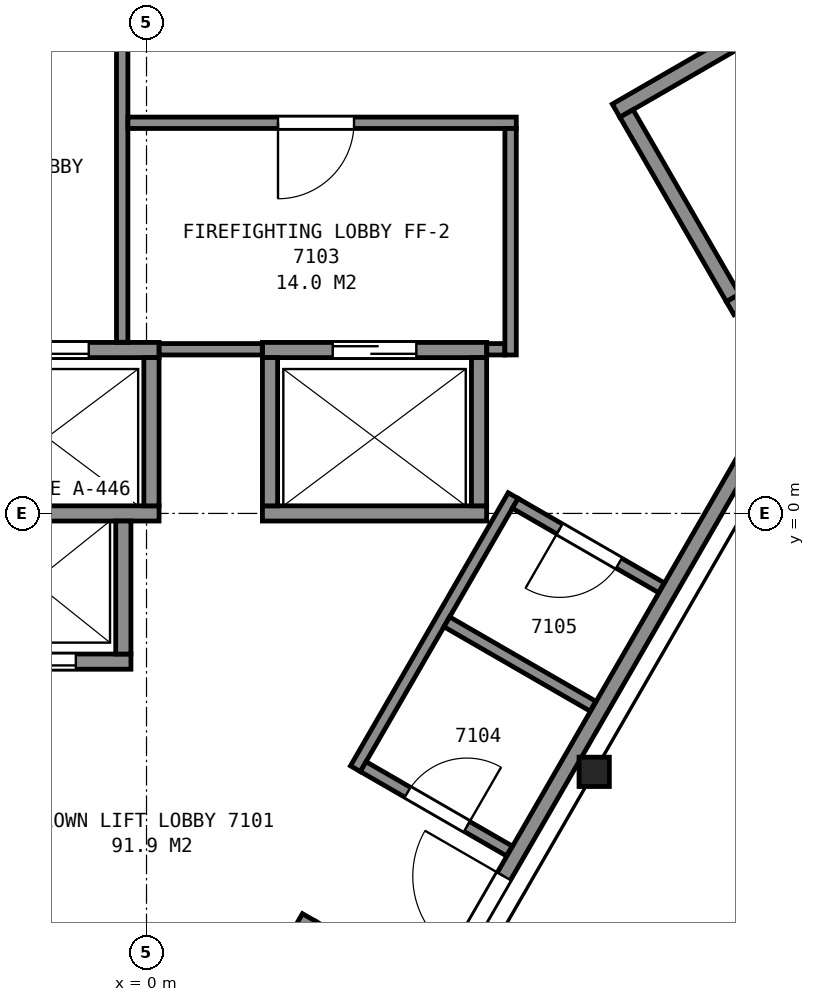
"""IFC4 building model, lengths in metres.
Left out: names, types, materials, properties, quantities, classifications, styles, units other than length and angle.
Written with IfcOpenShell. Run it as: python <this file> out.ifc"""

import sys

from ifc_helpers import new_model, si_unit, direction, frame, frame_2d, origin, origin_2d, place, context, subcontext, project, spatial, rectangle, i_section, extrude, element, fill, save


model = new_model("IFC4")
c1 = context("Model", 3, precision=1e-05, world=origin(), true_north=direction((0.0, 1.0)))
c2 = subcontext(c1, "Body", "Model", "MODEL_VIEW")
j1 = project(units=[si_unit("LENGTHUNIT", "METRE"), si_unit("PLANEANGLEUNIT", "RADIAN")], contexts=[c1])
p1 = place(None, origin())
s1 = spatial("IfcSite", under=j1, at=p1, CompositionType="ELEMENT")
p2 = place(p1, origin())
s2 = spatial("IfcBuilding", under=s1, at=p2, CompositionType="ELEMENT")
p3 = place(p2, frame((0.0, 0.0, 282.5)))
s3 = spatial("IfcBuildingStorey", under=s2, at=p3, CompositionType="ELEMENT", Elevation=282.5)
p4 = place(p3, frame((5.89, -3.4, 0.0), z_axis=(0.0, 0.0, 1.0), x_axis=(1.0, 0.0, 0.0)))
e1 = element("IfcColumn", 1, at=p4, inside=s3, PredefinedType="COLUMN", context=c2, shape_type="SweptSolid", body=[
    extrude(i_section(OverallWidth=0.399, OverallDepth=0.386, WebThickness=0.021, FlangeThickness=0.033, FilletRadius=0.015, at=origin_2d()), origin(), (0.0, 0.0, 1.0), 3.7),
])
for number, where, z_axis, x_axis in (
    (2, (6.178, 5.299, 0.0), (0.0, 0.0, 1.0), (0.866, 0.5, 0.0)),
    (3, (7.678, 2.701, 0.0), (0.0, 0.0, 1.0), (0.866, 0.5, 0.0)),
):
    element("IfcWall", number, at=place(p3, frame(where, z_axis=z_axis, x_axis=x_axis)), inside=s3, PredefinedType="PARTITIONING", context=c2, shape_type="SweptSolid", body=[
        extrude(rectangle(XDim=7.2, YDim=0.2, at=frame_2d((3.6, 0.0))), origin(), (0.0, 0.0, 1.0), 3.45),
    ])
p5 = place(p3, frame((7.715, 2.838, 0.0), z_axis=(0.0, 0.0, 1.0), x_axis=(-0.500049511043, 0.865996816683, 0.0)))
e4 = element("IfcWall", 4, at=p5, inside=s3, PredefinedType="PARTITIONING", context=c2, shape_type="SweptSolid", body=[
    extrude(rectangle(XDim=2.8, YDim=0.2, at=frame_2d((1.4, 0.0))), origin(), (0.0, 0.0, 1.0), 3.45),
])
p6 = place(p3, frame((-2.755, -1.95, 0.0), z_axis=(0.0, 0.0, 1.0), x_axis=(1.0, 0.0, 0.0)))
e5 = element("IfcWall", 5, at=p6, inside=s3, PredefinedType="PARTITIONING", context=c2, shape_type="SweptSolid", body=[
    extrude(rectangle(XDim=2.55, YDim=0.2, at=frame_2d((1.275, 0.0))), origin(), (0.0, 0.0, 1.0), 3.7),
])
p7 = place(p6, frame((0.725, 0.0, 0.0)))
e6 = element("IfcOpeningElement", 6, at=p7, cuts=e5, PredefinedType="OPENING", context=c2, shape_type="SweptSolid", body=[
    extrude(rectangle(XDim=1.1, YDim=2.1, at=frame_2d((0.55, 1.05))), frame((0.0, 0.11, 0.0), z_axis=(0.0, -1.0, 0.0), x_axis=(1.0, 0.0, 0.0)), (0.0, 0.0, 1.0), 0.22),
])
p8 = place(p3, frame((-2.785, 0.0, 0.0), z_axis=(0.0, 0.0, 1.0), x_axis=(1.0, 0.0, 0.0)))
e7 = element("IfcWall", 7, at=p8, inside=s3, PredefinedType="PARTITIONING", context=c2, shape_type="SweptSolid", body=[
    extrude(rectangle(XDim=2.95, YDim=0.2, at=frame_2d((1.475, 0.0))), origin(), (0.0, 0.0, 1.0), 3.7),
])
p9 = place(p3, frame((1.525, 0.0, 0.0), z_axis=(0.0, 0.0, 1.0), x_axis=(1.0, 0.0, 0.0)))
e8 = element("IfcWall", 8, at=p9, inside=s3, PredefinedType="PARTITIONING", context=c2, shape_type="SweptSolid", body=[
    extrude(rectangle(XDim=2.95, YDim=0.2, at=frame_2d((1.475, 0.0))), origin(), (0.0, 0.0, 1.0), 3.7),
])
p10 = place(p3, frame((-2.785, 2.15, 0.0), z_axis=(0.0, 0.0, 1.0), x_axis=(1.0, 0.0, 0.0)))
e9 = element("IfcWall", 9, at=p10, inside=s3, PredefinedType="PARTITIONING", context=c2, shape_type="SweptSolid", body=[
    extrude(rectangle(XDim=2.95, YDim=0.2, at=frame_2d((1.475, 0.0))), origin(), (0.0, 0.0, 1.0), 3.7),
])
p11 = place(p10, frame((0.925, 0.0, 0.0)))
e10 = element("IfcOpeningElement", 10, at=p11, cuts=e9, PredefinedType="OPENING", context=c2, shape_type="SweptSolid", body=[
    extrude(rectangle(XDim=1.1, YDim=2.1, at=frame_2d((0.55, 1.05))), frame((0.0, 0.11, 0.0), z_axis=(0.0, -1.0, 0.0), x_axis=(1.0, 0.0, 0.0)), (0.0, 0.0, 1.0), 0.22),
])
p12 = place(p3, frame((1.525, 2.15, 0.0), z_axis=(0.0, 0.0, 1.0), x_axis=(1.0, 0.0, 0.0)))
e11 = element("IfcWall", 11, at=p12, inside=s3, PredefinedType="PARTITIONING", context=c2, shape_type="SweptSolid", body=[
    extrude(rectangle(XDim=2.95, YDim=0.2, at=frame_2d((1.475, 0.0))), origin(), (0.0, 0.0, 1.0), 3.7),
])
p13 = place(p12, frame((0.925, 0.0, 0.0)))
e12 = element("IfcOpeningElement", 12, at=p13, cuts=e11, PredefinedType="OPENING", context=c2, shape_type="SweptSolid", body=[
    extrude(rectangle(XDim=1.1, YDim=2.1, at=frame_2d((0.55, 1.05))), frame((0.0, 0.11, 0.0), z_axis=(0.0, -1.0, 0.0), x_axis=(1.0, 0.0, 0.0)), (0.0, 0.0, 1.0), 0.22),
])
p14 = place(p3, frame((0.863, -7.525, 0.0), z_axis=(0.0, 0.0, 1.0), x_axis=(0.499990435942, 0.866030925526, 0.0)))
e13 = element("IfcWall", 13, at=p14, inside=s3, PredefinedType="PARTITIONING", context=c2, shape_type="SweptSolid", body=[
    extrude(rectangle(XDim=2.55, YDim=0.2, at=frame_2d((1.275, 0.0))), origin(), (0.0, 0.0, 1.0), 3.7),
])
p15 = place(p14, frame((0.725, 0.0, 0.0)))
e14 = element("IfcOpeningElement", 14, at=p15, cuts=e13, PredefinedType="OPENING", context=c2, shape_type="SweptSolid", body=[
    extrude(rectangle(XDim=1.1, YDim=2.1, at=frame_2d((0.55, 1.05))), frame((0.0, 0.11, 0.0), z_axis=(0.0, -1.0, 0.0), x_axis=(1.0, 0.0, 0.0)), (0.0, 0.0, 1.0), 0.22),
])
for number, where, z_axis, x_axis in (
    (15, (4.375, 0.1, 0.0), (0.0, 0.0, 1.0), (0.0, 1.0, 0.0)),
    (16, (1.625, 0.1, 0.0), (0.0, 0.0, 1.0), (0.0, 1.0, 0.0)),
    (17, (0.065, 0.1, 0.0), (0.0, 0.0, 1.0), (0.0, 1.0, 0.0)),
):
    element("IfcWall", number, at=place(p3, frame(where, z_axis=z_axis, x_axis=x_axis)), inside=s3, PredefinedType="PARTITIONING", context=c2, shape_type="SweptSolid", body=[
        extrude(rectangle(XDim=1.95, YDim=0.2, at=frame_2d((0.975, 0.0))), origin(), (0.0, 0.0, 1.0), 3.7),
    ])
for number, where, z_axis, x_axis in (
    (18, (-0.305, -1.85, 0.0), (0.0, 0.0, 1.0), (0.0, 1.0, 0.0)),
    (19, (3.69, -6.328, 0.0), (0.0, 0.0, 1.0), (-0.866, 0.5, 0.0)),
):
    element("IfcWall", number, at=place(p3, frame(where, z_axis=z_axis, x_axis=x_axis)), inside=s3, PredefinedType="PARTITIONING", context=c2, shape_type="SweptSolid", body=[
        extrude(rectangle(XDim=1.75, YDim=0.2, at=frame_2d((0.875, 0.0))), origin(), (0.0, 0.0, 1.0), 3.7),
    ])
p16 = place(p3, frame((-0.32, 2.252, 0.0), z_axis=(0.0, 0.0, 1.0), x_axis=(0.0, 1.0, 0.0)))
e20 = element("IfcWall", 20, at=p16, inside=s3, PredefinedType="PARTITIONING", context=c2, shape_type="SweptSolid", body=[
    extrude(rectangle(XDim=4.063, YDim=0.15, at=frame_2d((2.031, 0.0))), origin(), (0.0, 0.0, 1.0), 3.45),
])
p17 = place(p3, frame((-0.245, 5.14, 0.0), z_axis=(0.0, 0.0, 1.0), x_axis=(1.0, 0.0, 0.0)))
e21 = element("IfcWall", 21, at=p17, inside=s3, PredefinedType="PARTITIONING", context=c2, shape_type="SweptSolid", body=[
    extrude(rectangle(XDim=5.11, YDim=0.15, at=frame_2d((2.555, 0.0))), origin(), (0.0, 0.0, 1.0), 3.45),
])
p18 = place(p17, frame((1.975, 0.0, 0.0)))
e22 = element("IfcOpeningElement", 22, at=p18, cuts=e21, PredefinedType="OPENING", context=c2, shape_type="SweptSolid", body=[
    extrude(rectangle(XDim=1.0, YDim=2.1, at=frame_2d((0.5, 1.05))), frame((0.0, 0.085, 0.0), z_axis=(0.0, -1.0, 0.0), x_axis=(1.0, 0.0, 0.0)), (0.0, 0.0, 1.0), 0.17),
])
p19 = place(p3, frame((0.167, 2.16, 0.0), z_axis=(0.0, 0.0, 1.0), x_axis=(1.0, 0.0, 0.0)))
e23 = element("IfcWall", 23, at=p19, inside=s3, PredefinedType="PARTITIONING", context=c2, shape_type="SweptSolid", body=[
    extrude(rectangle(XDim=1.356, YDim=0.15, at=frame_2d((0.678, 0.0))), origin(), (0.0, 0.0, 1.0), 3.45),
])
p20 = place(p3, frame((2.749, -3.359, 0.0), z_axis=(0.0, 0.0, 1.0), x_axis=(0.500017827812, 0.866015110648, 0.0)))
e24 = element("IfcWall", 24, at=p20, inside=s3, PredefinedType="PARTITIONING", context=c2, shape_type="SweptSolid", body=[
    extrude(rectangle(XDim=4.15, YDim=0.15, at=frame_2d((2.075, 0.0))), origin(), (0.0, 0.0, 1.0), 3.45),
])
p21 = place(p3, frame((2.851, -3.332, 0.0), z_axis=(0.0, 0.0, 1.0), x_axis=(0.866110524189, -0.499852538144, 0.0)))
e25 = element("IfcWall", 25, at=p21, inside=s3, PredefinedType="PARTITIONING", context=c2, shape_type="SweptSolid", body=[
    extrude(rectangle(XDim=2.22, YDim=0.15, at=frame_2d((1.11, 0.0))), origin(), (0.0, 0.0, 1.0), 3.45),
])
p22 = place(p21, frame((0.675, 0.0, 0.0)))
e26 = element("IfcOpeningElement", 26, at=p22, cuts=e25, PredefinedType="OPENING", context=c2, shape_type="SweptSolid", body=[
    extrude(rectangle(XDim=0.9, YDim=2.1, at=frame_2d((0.45, 1.05))), frame((0.0, 0.085, 0.0), z_axis=(0.0, -1.0, 0.0), x_axis=(1.0, 0.0, 0.0)), (0.0, 0.0, 1.0), 0.17),
])
p23 = place(p3, frame((3.828, -6.29, 0.0), z_axis=(0.0, 0.0, 1.0), x_axis=(0.499979739078, 0.866037101117, 0.0)))
e27 = element("IfcWall", 27, at=p23, inside=s3, PredefinedType="PARTITIONING", context=c2, shape_type="SweptSolid", body=[
    extrude(rectangle(XDim=11.363, YDim=0.2, at=frame_2d((5.681, 0.0))), origin(), (0.0, 0.0, 1.0), 3.45),
])
p24 = place(p23, frame((0.55, 0.0, 0.0)))
e28 = element("IfcOpeningElement", 28, at=p24, cuts=e27, PredefinedType="OPENING", context=c2, shape_type="SweptSolid", body=[
    extrude(rectangle(XDim=1.2, YDim=2.1, at=frame_2d((0.6, 1.05))), frame((0.0, 0.11, 0.0), z_axis=(0.0, -1.0, 0.0), x_axis=(1.0, 0.0, 0.0)), (0.0, 0.0, 1.0), 0.22),
])
p25 = place(p3, frame((3.951, -1.427, 0.0), z_axis=(0.0, 0.0, 1.0), x_axis=(0.866062920605, -0.499935013329, 0.0)))
e29 = element("IfcWall", 29, at=p25, inside=s3, PredefinedType="PARTITIONING", context=c2, shape_type="SweptSolid", body=[
    extrude(rectangle(XDim=2.22, YDim=0.15, at=frame_2d((1.11, 0.0))), origin(), (0.0, 0.0, 1.0), 3.45),
])
p26 = place(p3, frame((4.477, 2.16, 0.0), z_axis=(0.0, 0.0, 1.0), x_axis=(1.0, 0.0, 0.0)))
e30 = element("IfcWall", 30, at=p26, inside=s3, PredefinedType="PARTITIONING", context=c2, shape_type="SweptSolid", body=[
    extrude(rectangle(XDim=0.238, YDim=0.15, at=frame_2d((0.119, 0.0))), origin(), (0.0, 0.0, 1.0), 3.45),
])
p27 = place(p3, frame((6.774, -0.978, 0.0), z_axis=(0.0, 0.0, 1.0), x_axis=(-0.866062920605, 0.499935013329, 0.0)))
e31 = element("IfcWall", 31, at=p27, inside=s3, PredefinedType="PARTITIONING", context=c2, shape_type="SweptSolid", body=[
    extrude(rectangle(XDim=2.22, YDim=0.15, at=frame_2d((1.11, 0.0))), origin(), (0.0, 0.0, 1.0), 3.45),
])
p28 = place(p27, frame((0.646, 0.0, 0.0)))
e32 = element("IfcOpeningElement", 32, at=p28, cuts=e31, PredefinedType="OPENING", context=c2, shape_type="SweptSolid", body=[
    extrude(rectangle(XDim=0.9, YDim=2.1, at=frame_2d((0.45, 1.05))), frame((0.0, 0.085, 0.0), z_axis=(0.0, -1.0, 0.0), x_axis=(1.0, 0.0, 0.0)), (0.0, 0.0, 1.0), 0.17),
])
p29 = place(p3, frame((4.79, 2.085, 0.0), z_axis=(0.0, 0.0, 1.0), x_axis=(0.0, 1.0, 0.0)))
e33 = element("IfcWall", 33, at=p29, inside=s3, PredefinedType="PARTITIONING", context=c2, shape_type="SweptSolid", body=[
    extrude(rectangle(XDim=2.98, YDim=0.15, at=frame_2d((1.49, 0.0))), origin(), (0.0, 0.0, 1.0), 3.45),
])
p30 = place(p3, frame((7.682, -8.47, 0.0), z_axis=(0.0, 0.0, 1.0), x_axis=(0.698777378461, 0.715339203002, 0.0)))
e34 = element("IfcWall", 34, at=p30, inside=s3, PredefinedType="PARTITIONING", context=c2, shape_type="SweptSolid", body=[
    extrude(rectangle(XDim=4.452, YDim=0.1, at=frame_2d((2.226, 0.0))), origin(), (0.0, 0.0, 1.0), 2.723),
])
p31 = place(p7, origin())
e35 = element("IfcDoor", 35, at=p31, inside=s3, OperationType="SLIDING_TO_RIGHT", PredefinedType="DOOR", context=c2, shape_type="SweptSolid", body=[
    extrude(rectangle(XDim=1.1, YDim=2.1, at=frame_2d((0.55, 1.05))), frame((0.0, 0.025, 0.0), z_axis=(0.0, -1.0, 0.0), x_axis=(1.0, 0.0, 0.0)), (0.0, 0.0, 1.0), 0.05),
])
fill(e6, e35)
p32 = place(p11, origin())
e36 = element("IfcDoor", 36, at=p32, inside=s3, OperationType="SLIDING_TO_LEFT", PredefinedType="DOOR", context=c2, shape_type="SweptSolid", body=[
    extrude(rectangle(XDim=1.1, YDim=2.1, at=frame_2d((0.55, 1.05))), frame((0.0, 0.025, 0.0), z_axis=(0.0, -1.0, 0.0), x_axis=(1.0, 0.0, 0.0)), (0.0, 0.0, 1.0), 0.05),
])
fill(e10, e36)
p33 = place(p13, origin())
e37 = element("IfcDoor", 37, at=p33, inside=s3, OperationType="SLIDING_TO_RIGHT", PredefinedType="DOOR", context=c2, shape_type="SweptSolid", body=[
    extrude(rectangle(XDim=1.1, YDim=2.1, at=frame_2d((0.55, 1.05))), frame((0.0, 0.025, 0.0), z_axis=(0.0, -1.0, 0.0), x_axis=(1.0, 0.0, 0.0)), (0.0, 0.0, 1.0), 0.05),
])
fill(e12, e37)
p34 = place(p18, origin())
e38 = element("IfcDoor", 38, at=p34, inside=s3, OperationType="SINGLE_SWING_LEFT", PredefinedType="DOOR", context=c2, shape_type="SweptSolid", body=[
    extrude(rectangle(XDim=1.0, YDim=2.1, at=frame_2d((0.5, 1.05))), frame((0.0, 0.025, 0.0), z_axis=(0.0, -1.0, 0.0), x_axis=(1.0, 0.0, 0.0)), (0.0, 0.0, 1.0), 0.05),
])
fill(e22, e38)
p35 = place(p22, origin())
e39 = element("IfcDoor", 39, at=p35, inside=s3, OperationType="SINGLE_SWING_RIGHT", PredefinedType="DOOR", context=c2, shape_type="SweptSolid", body=[
    extrude(rectangle(XDim=0.9, YDim=2.1, at=frame_2d((0.45, 1.05))), frame((0.0, 0.025, 0.0), z_axis=(0.0, -1.0, 0.0), x_axis=(1.0, 0.0, 0.0)), (0.0, 0.0, 1.0), 0.05),
])
fill(e26, e39)
p36 = place(p24, origin())
e40 = element("IfcDoor", 40, at=p36, inside=s3, OperationType="SINGLE_SWING_RIGHT", PredefinedType="DOOR", context=c2, shape_type="SweptSolid", body=[
    extrude(rectangle(XDim=1.2, YDim=2.1, at=frame_2d((0.6, 1.05))), frame((0.0, 0.025, 0.0), z_axis=(0.0, -1.0, 0.0), x_axis=(1.0, 0.0, 0.0)), (0.0, 0.0, 1.0), 0.05),
])
fill(e28, e40)
p37 = place(p28, origin())
e41 = element("IfcDoor", 41, at=p37, inside=s3, OperationType="SINGLE_SWING_RIGHT", PredefinedType="DOOR", context=c2, shape_type="SweptSolid", body=[
    extrude(rectangle(XDim=0.9, YDim=2.1, at=frame_2d((0.45, 1.05))), frame((0.0, 0.025, 0.0), z_axis=(0.0, -1.0, 0.0), x_axis=(1.0, 0.0, 0.0)), (0.0, 0.0, 1.0), 0.05),
])
fill(e32, e41)
save(model, sys.argv[1])
